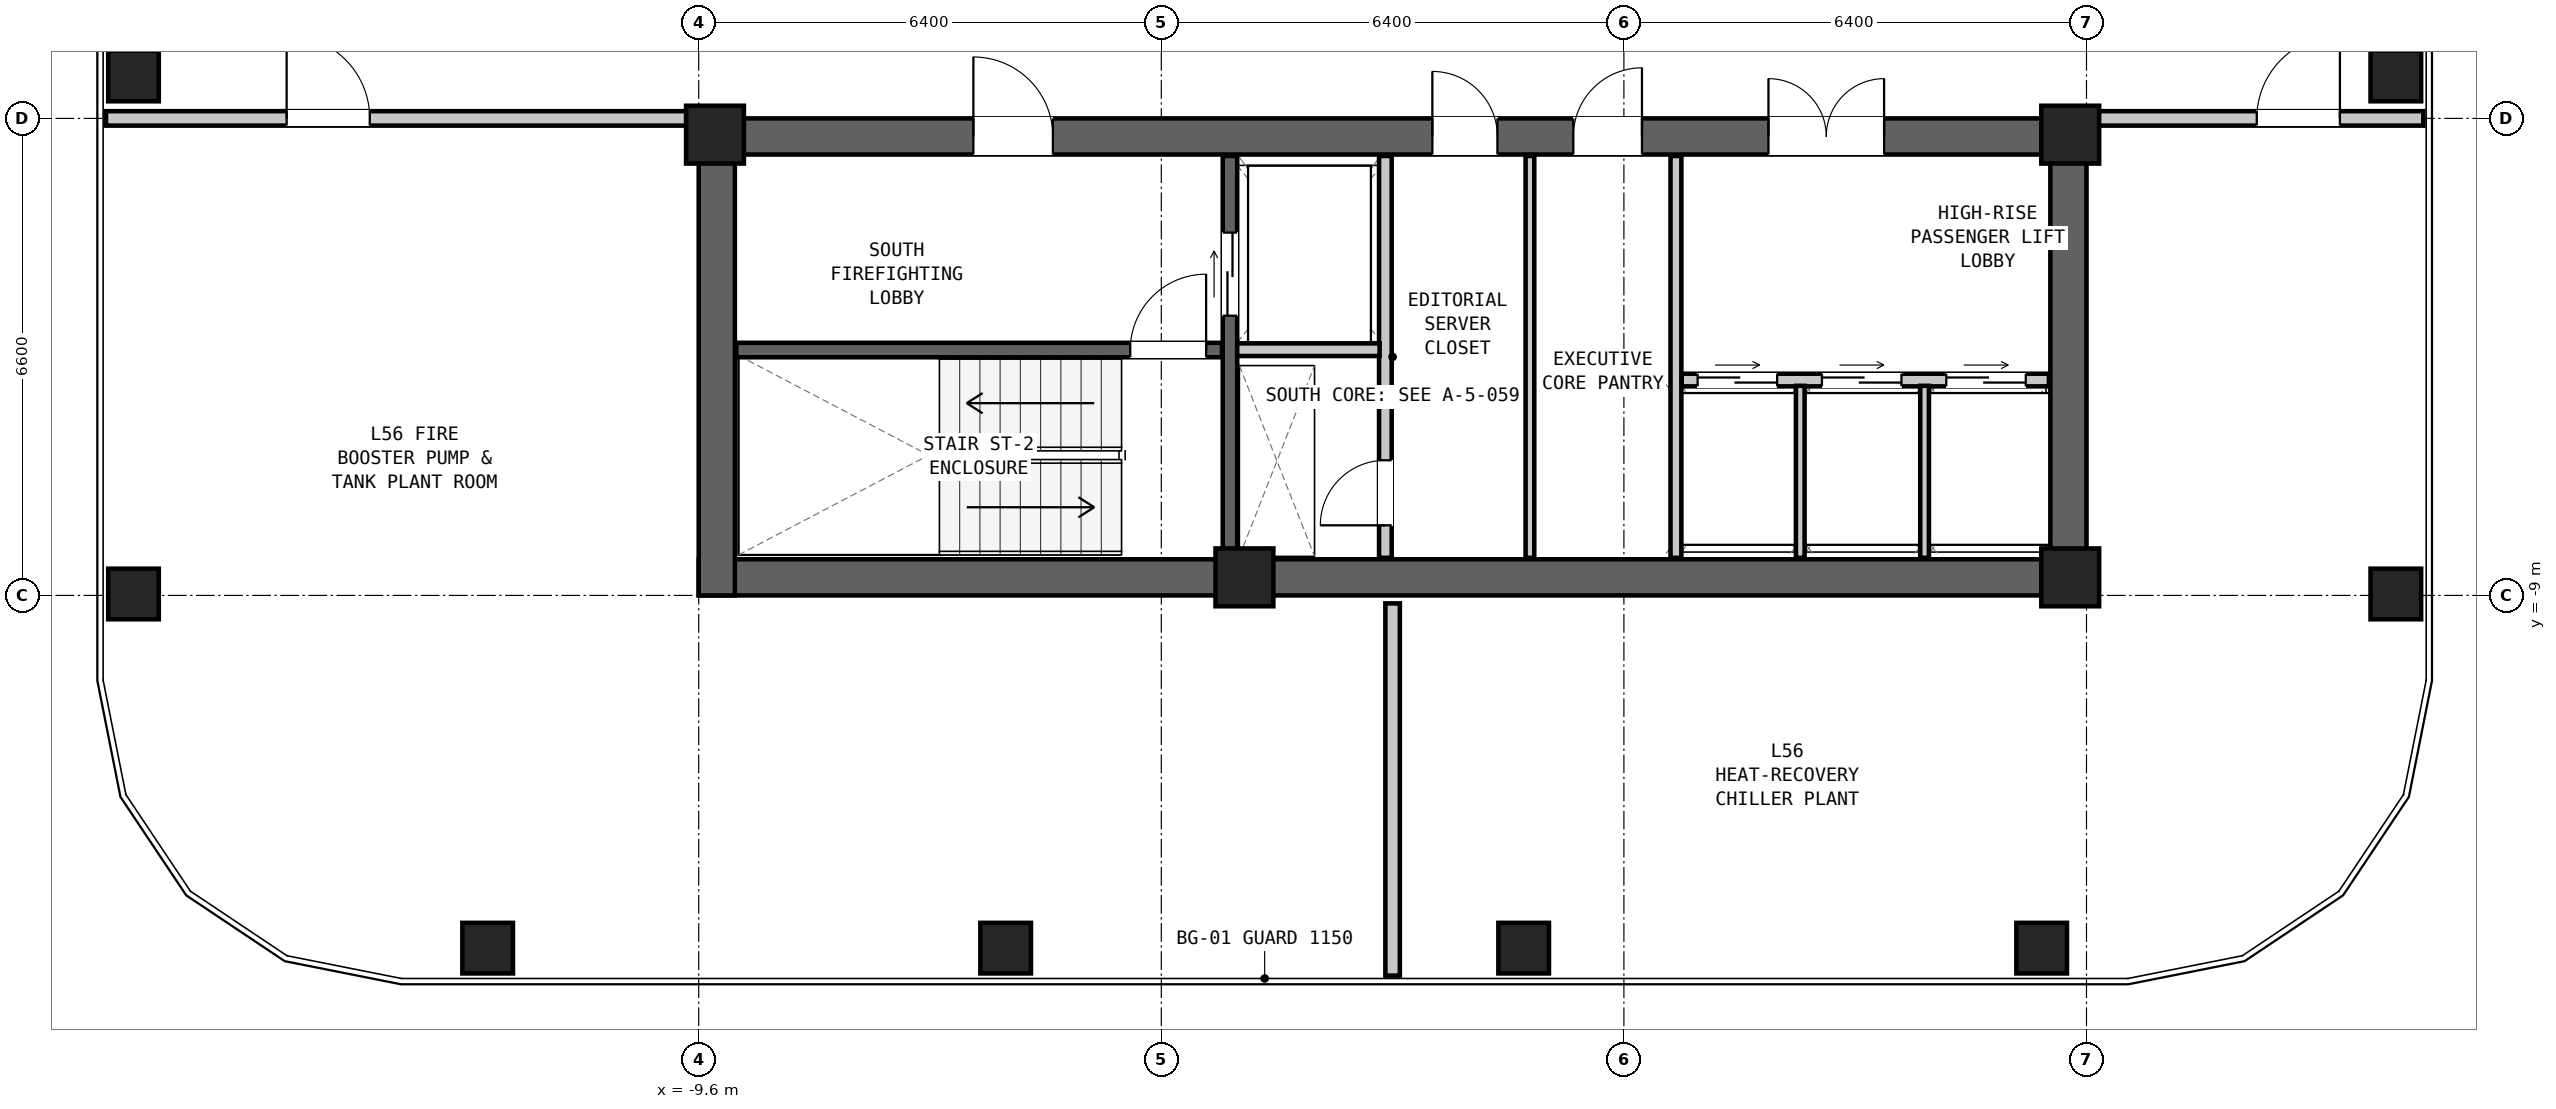
"""IFC4 building model, lengths in metres.
Left out: names, types, materials, properties, quantities, classifications, styles, units other than length and angle.
Written with IfcOpenShell. Run it as: python <this file> out.ifc"""

import sys

from ifc_helpers import new_model, si_unit, direction, frame, frame_2d, origin, origin_2d, place, context, subcontext, project, spatial, rectangle, hollow_rectangle, extrude, element, fill, save


model = new_model("IFC4")
c1 = context("Model", 3, precision=1e-05, world=origin(), true_north=direction((0.0, 1.0)))
c2 = subcontext(c1, "Body", "Model", "MODEL_VIEW")
j1 = project(units=[si_unit("LENGTHUNIT", "METRE"), si_unit("PLANEANGLEUNIT", "RADIAN")], contexts=[c1])
p1 = place(None, origin())
s1 = spatial("IfcSite", under=j1, at=p1, CompositionType="ELEMENT")
p2 = place(p1, origin())
s2 = spatial("IfcBuilding", under=s1, at=p2, CompositionType="ELEMENT")
p3 = place(p2, frame((0.0, 0.0, 191.55)))
s3 = spatial("IfcBuildingStorey", under=s2, at=p3, CompositionType="ELEMENT", Elevation=191.55)
p4 = place(p3, frame((-9.6, -8.75, 0.0), z_axis=(0.0, 0.0, 1.0), x_axis=(1.0, 0.0, 0.0)))
e1 = element("IfcWall", 1, at=p4, inside=s3, PredefinedType="SHEAR", context=c2, shape_type="SweptSolid", body=[
    extrude(rectangle(XDim=19.2, YDim=0.5, at=frame_2d((9.6, 0.0))), origin(), (0.0, 0.0, 1.0), 3.6),
])
p5 = place(p3, frame((-9.6, -2.65, 0.0), z_axis=(0.0, 0.0, 1.0), x_axis=(1.0, 0.0, 0.0)))
e2 = element("IfcWall", 2, at=p5, inside=s3, PredefinedType="SHEAR", context=c2, shape_type="SweptSolid", body=[
    extrude(rectangle(XDim=19.2, YDim=0.5, at=frame_2d((9.6, 0.0))), origin(), (0.0, 0.0, 1.0), 3.6),
])
p6 = place(p5, frame((3.8, 0.0, 0.0)))
e3 = element("IfcOpeningElement", 3, at=p6, cuts=e2, PredefinedType="OPENING", context=c2, shape_type="SweptSolid", body=[
    extrude(rectangle(XDim=1.1, YDim=2.08, at=frame_2d((0.55, 1.04))), frame((0.0, 0.262, 0.0), z_axis=(0.0, -1.0, 0.0), x_axis=(1.0, 0.0, 0.0)), (0.0, 0.0, 1.0), 0.524),
])
p7 = place(p5, frame((10.15, 0.0, 0.0)))
e4 = element("IfcOpeningElement", 4, at=p7, cuts=e2, PredefinedType="OPENING", context=c2, shape_type="SweptSolid", body=[
    extrude(rectangle(XDim=0.9, YDim=2.05, at=frame_2d((0.45, 1.025))), frame((0.0, 0.262, 0.0), z_axis=(0.0, -1.0, 0.0), x_axis=(1.0, 0.0, 0.0)), (0.0, 0.0, 1.0), 0.524),
])
p8 = place(p5, frame((12.1, 0.0, 0.0)))
e5 = element("IfcOpeningElement", 5, at=p8, cuts=e2, PredefinedType="OPENING", context=c2, shape_type="SweptSolid", body=[
    extrude(rectangle(XDim=0.95, YDim=2.1, at=frame_2d((0.475, 1.05))), frame((0.0, 0.262, 0.0), z_axis=(0.0, -1.0, 0.0), x_axis=(1.0, 0.0, 0.0)), (0.0, 0.0, 1.0), 0.524),
])
p9 = place(p5, frame((14.8, 0.0, 0.0)))
e6 = element("IfcOpeningElement", 6, at=p9, cuts=e2, PredefinedType="OPENING", context=c2, shape_type="SweptSolid", body=[
    extrude(rectangle(XDim=1.6, YDim=2.12, at=frame_2d((0.8, 1.06))), frame((0.0, 0.262, 0.0), z_axis=(0.0, -1.0, 0.0), x_axis=(1.0, 0.0, 0.0)), (0.0, 0.0, 1.0), 0.524),
])
for number, where, z_axis, x_axis in (
    (7, (-9.35, -9.0, 0.0), (0.0, 0.0, 1.0), (0.0, 1.0, 0.0)),
    (8, (9.35, -9.0, 0.0), (0.0, 0.0, 1.0), (0.0, 1.0, 0.0)),
):
    element("IfcWall", number, at=place(p3, frame(where, z_axis=z_axis, x_axis=x_axis)), inside=s3, PredefinedType="SHEAR", context=c2, shape_type="SweptSolid", body=[
        extrude(rectangle(XDim=6.6, YDim=0.5, at=frame_2d((3.3, 0.0))), origin(), (0.0, 0.0, 1.0), 3.6),
    ])
for number, where, z_axis, x_axis in (
    (9, (-12.52, -13.88, 0.0), (0.0, 0.0, 1.0), (1.0, 0.0, 0.0)),
    (10, (-5.353, -13.88, 0.0), (0.0, 0.0, 1.0), (1.0, 0.0, 0.0)),
    (11, (1.813, -13.88, 0.0), (0.0, 0.0, 1.0), (1.0, 0.0, 0.0)),
    (12, (8.98, -13.88, 0.0), (0.0, 0.0, 1.0), (1.0, 0.0, 0.0)),
    (13, (13.88, -8.98, 0.0), (0.0, 0.0, 1.0), (0.0, 1.0, 0.0)),
    (14, (13.88, -1.813, 0.0), (0.0, 0.0, 1.0), (0.0, 1.0, 0.0)),
    (15, (-17.42, -1.813, 0.0), (0.0, 0.0, 1.0), (0.0, 1.0, 0.0)),
    (16, (-17.42, -8.98, 0.0), (0.0, 0.0, 1.0), (0.0, 1.0, 0.0)),
):
    element("IfcColumn", number, at=place(p3, frame(where, z_axis=z_axis, x_axis=x_axis)), inside=s3, PredefinedType="COLUMN", context=c2, shape_type="SweptSolid", body=[
        extrude(hollow_rectangle(XDim=0.7, YDim=0.7, WallThickness=0.045, at=origin_2d()), origin(), (0.0, 0.0, 1.0), 3.6),
    ])
for number, where, z_axis, x_axis in (
    (17, (-9.375, -2.625, 0.0), (0.0, 0.0, 1.0), (1.0, 0.0, 0.0)),
    (18, (9.375, -2.625, 0.0), (0.0, 0.0, 1.0), (1.0, 0.0, 0.0)),
    (19, (-2.05, -8.75, 0.0), (0.0, 0.0, 1.0), (1.0, 0.0, 0.0)),
    (20, (9.375, -8.75, 0.0), (0.0, 0.0, 1.0), (1.0, 0.0, 0.0)),
):
    element("IfcColumn", number, at=place(p3, frame(where, z_axis=z_axis, x_axis=x_axis)), inside=s3, PredefinedType="COLUMN", context=c2, shape_type="SweptSolid", body=[
        extrude(rectangle(XDim=0.8, YDim=0.8, at=origin_2d()), origin(), (0.0, 0.0, 1.0), 3.6),
    ])
p10 = place(p3, frame((-9.08, -5.605, 0.0), z_axis=(0.0, 0.0, 1.0), x_axis=(1.0, 0.0, 0.0)))
e21 = element("IfcWall", 21, at=p10, inside=s3, PredefinedType="SHEAR", context=c2, shape_type="SweptSolid", body=[
    extrude(rectangle(XDim=6.72, YDim=0.2, at=frame_2d((3.36, 0.0))), origin(), (0.0, 0.0, 1.0), 3.22),
])
p11 = place(p10, frame((5.45, 0.0, 0.0)))
e22 = element("IfcOpeningElement", 22, at=p11, cuts=e21, PredefinedType="OPENING", context=c2, shape_type="SweptSolid", body=[
    extrude(rectangle(XDim=1.05, YDim=2.08, at=frame_2d((0.525, 1.04))), frame((0.0, 0.112, 0.0), z_axis=(0.0, -1.0, 0.0), x_axis=(1.0, 0.0, 0.0)), (0.0, 0.0, 1.0), 0.224),
])
p12 = place(p3, frame((-2.25, -8.48, 0.0), z_axis=(0.0, 0.0, 1.0), x_axis=(0.0, 1.0, 0.0)))
e23 = element("IfcWall", 23, at=p12, inside=s3, PredefinedType="SHEAR", context=c2, shape_type="SweptSolid", body=[
    extrude(rectangle(XDim=5.56, YDim=0.2, at=frame_2d((2.78, 0.0))), origin(), (0.0, 0.0, 1.0), 3.22),
])
p13 = place(p12, frame((3.35, 0.0, 0.0)))
e24 = element("IfcOpeningElement", 24, at=p13, cuts=e23, PredefinedType="OPENING", context=c2, shape_type="SweptSolid", body=[
    extrude(rectangle(XDim=1.15, YDim=2.08, at=frame_2d((0.575, 1.04))), frame((0.0, 0.112, 0.0), z_axis=(0.0, -1.0, 0.0), x_axis=(1.0, 0.0, 0.0)), (0.0, 0.0, 1.0), 0.224),
])
p14 = place(p3, frame((-0.1, -8.48, 0.0), z_axis=(0.0, 0.0, 1.0), x_axis=(0.0, 1.0, 0.0)))
e25 = element("IfcWall", 25, at=p14, inside=s3, PredefinedType="PARTITIONING", context=c2, shape_type="SweptSolid", body=[
    extrude(rectangle(XDim=5.56, YDim=0.175, at=frame_2d((2.78, 0.0))), origin(), (0.0, 0.0, 1.0), 3.22),
])
p15 = place(p14, frame((0.45, 0.0, 0.0)))
e26 = element("IfcOpeningElement", 26, at=p15, cuts=e25, PredefinedType="OPENING", context=c2, shape_type="SweptSolid", body=[
    extrude(rectangle(XDim=0.9, YDim=2.05, at=frame_2d((0.45, 1.025))), frame((0.0, 0.1, 0.0), z_axis=(0.0, -1.0, 0.0), x_axis=(1.0, 0.0, 0.0)), (0.0, 0.0, 1.0), 0.199),
])
p16 = place(p3, frame((-2.15, -5.6, 0.0), z_axis=(0.0, 0.0, 1.0), x_axis=(1.0, 0.0, 0.0)))
e27 = element("IfcWall", 27, at=p16, inside=s3, PredefinedType="PARTITIONING", context=c2, shape_type="SweptSolid", body=[
    extrude(rectangle(XDim=1.97, YDim=0.175, at=frame_2d((0.985, 0.0))), origin(), (0.0, 0.0, 1.0), 3.22),
])
p17 = place(p3, frame((3.92, -8.48, 0.0), z_axis=(0.0, 0.0, 1.0), x_axis=(0.0, 1.0, 0.0)))
e28 = element("IfcWall", 28, at=p17, inside=s3, PredefinedType="PARTITIONING", context=c2, shape_type="SweptSolid", body=[
    extrude(rectangle(XDim=5.56, YDim=0.15, at=frame_2d((2.78, 0.0))), origin(), (0.0, 0.0, 1.0), 3.22),
])
p18 = place(p3, frame((1.9, -8.48, 0.0), z_axis=(0.0, 0.0, 1.0), x_axis=(0.0, 1.0, 0.0)))
e29 = element("IfcWall", 29, at=p18, inside=s3, PredefinedType="PARTITIONING", context=c2, shape_type="SweptSolid", body=[
    extrude(rectangle(XDim=5.56, YDim=0.12, at=frame_2d((2.78, 0.0))), origin(), (0.0, 0.0, 1.0), 3.22),
])
p19 = place(p3, frame((4.0, -6.02, 0.0), z_axis=(0.0, 0.0, 1.0), x_axis=(1.0, 0.0, 0.0)))
e30 = element("IfcWall", 30, at=p19, inside=s3, PredefinedType="PARTITIONING", context=c2, shape_type="SweptSolid", body=[
    extrude(rectangle(XDim=5.08, YDim=0.175, at=frame_2d((2.54, 0.0))), origin(), (0.0, 0.0, 1.0), 3.22),
])
p20 = place(p19, frame((0.22, 0.0, 0.0)))
e31 = element("IfcOpeningElement", 31, at=p20, cuts=e30, PredefinedType="OPENING", context=c2, shape_type="SweptSolid", body=[
    extrude(rectangle(XDim=1.1, YDim=2.06, at=frame_2d((0.55, 1.03))), frame((0.0, 0.1, 0.0), z_axis=(0.0, -1.0, 0.0), x_axis=(1.0, 0.0, 0.0)), (0.0, 0.0, 1.0), 0.199),
])
p21 = place(p19, frame((1.94, 0.0, 0.0)))
e32 = element("IfcOpeningElement", 32, at=p21, cuts=e30, PredefinedType="OPENING", context=c2, shape_type="SweptSolid", body=[
    extrude(rectangle(XDim=1.1, YDim=2.06, at=frame_2d((0.55, 1.03))), frame((0.0, 0.1, 0.0), z_axis=(0.0, -1.0, 0.0), x_axis=(1.0, 0.0, 0.0)), (0.0, 0.0, 1.0), 0.199),
])
p22 = place(p19, frame((3.66, 0.0, 0.0)))
e33 = element("IfcOpeningElement", 33, at=p22, cuts=e30, PredefinedType="OPENING", context=c2, shape_type="SweptSolid", body=[
    extrude(rectangle(XDim=1.1, YDim=2.06, at=frame_2d((0.55, 1.03))), frame((0.0, 0.1, 0.0), z_axis=(0.0, -1.0, 0.0), x_axis=(1.0, 0.0, 0.0)), (0.0, 0.0, 1.0), 0.199),
])
for number, where, z_axis, x_axis in (
    (34, (5.64, -8.48, 0.0), (0.0, 0.0, 1.0), (0.0, 1.0, 0.0)),
    (35, (7.36, -8.48, 0.0), (0.0, 0.0, 1.0), (0.0, 1.0, 0.0)),
):
    element("IfcWall", number, at=place(p3, frame(where, z_axis=z_axis, x_axis=x_axis)), inside=s3, PredefinedType="PARTITIONING", context=c2, shape_type="SweptSolid", body=[
        extrude(rectangle(XDim=2.38, YDim=0.12, at=frame_2d((1.19, 0.0))), origin(), (0.0, 0.0, 1.0), 3.22),
    ])
p23 = place(p3, frame((-17.8, -2.4, 0.0), z_axis=(0.0, 0.0, 1.0), x_axis=(1.0, 0.0, 0.0)))
e36 = element("IfcWall", 36, at=p23, inside=s3, PredefinedType="PARTITIONING", context=c2, shape_type="SweptSolid", body=[
    extrude(rectangle(XDim=8.09, YDim=0.2, at=frame_2d((4.045, 0.0))), origin(), (0.0, 0.0, 1.0), 2.42),
])
p24 = place(p23, frame((2.499, 0.0, 0.0)))
e37 = element("IfcOpeningElement", 37, at=p24, cuts=e36, PredefinedType="OPENING", context=c2, shape_type="SweptSolid", body=[
    extrude(rectangle(XDim=1.15, YDim=2.1, at=frame_2d((0.575, 1.05))), frame((0.0, 0.112, 0.0), z_axis=(0.0, -1.0, 0.0), x_axis=(1.0, 0.0, 0.0)), (0.0, 0.0, 1.0), 0.224),
])
p25 = place(p3, frame((9.71, -2.4, 0.0), z_axis=(0.0, 0.0, 1.0), x_axis=(1.0, 0.0, 0.0)))
e38 = element("IfcWall", 38, at=p25, inside=s3, PredefinedType="PARTITIONING", context=c2, shape_type="SweptSolid", body=[
    extrude(rectangle(XDim=4.55, YDim=0.2, at=frame_2d((2.275, 0.0))), origin(), (0.0, 0.0, 1.0), 2.42),
])
p26 = place(p25, frame((2.246, 0.0, 0.0)))
e39 = element("IfcOpeningElement", 39, at=p26, cuts=e38, PredefinedType="OPENING", context=c2, shape_type="SweptSolid", body=[
    extrude(rectangle(XDim=1.15, YDim=2.1, at=frame_2d((0.575, 1.05))), frame((0.0, 0.112, 0.0), z_axis=(0.0, -1.0, 0.0), x_axis=(1.0, 0.0, 0.0)), (0.0, 0.0, 1.0), 0.224),
])
p27 = place(p3, frame((0.0, -14.26, 0.0), z_axis=(0.0, 0.0, 1.0), x_axis=(0.0, 1.0, 0.0)))
e40 = element("IfcWall", 40, at=p27, inside=s3, PredefinedType="PARTITIONING", context=c2, shape_type="SweptSolid", body=[
    extrude(rectangle(XDim=5.15, YDim=0.2, at=frame_2d((2.575, 0.0))), origin(), (0.0, 0.0, 1.0), 2.438),
])
p28 = place(p11, origin())
e41 = element("IfcDoor", 41, at=p28, inside=s3, OperationType="SINGLE_SWING_RIGHT", PredefinedType="DOOR", context=c2, shape_type="SweptSolid", body=[
    extrude(rectangle(XDim=1.05, YDim=2.08, at=frame_2d((0.525, 1.04))), frame((0.0, 0.025, 0.0), z_axis=(0.0, -1.0, 0.0), x_axis=(1.0, 0.0, 0.0)), (0.0, 0.0, 1.0), 0.05),
])
fill(e22, e41)
p29 = place(p6, origin())
e42 = element("IfcDoor", 42, at=p29, inside=s3, OperationType="SINGLE_SWING_LEFT", PredefinedType="DOOR", context=c2, shape_type="SweptSolid", body=[
    extrude(rectangle(XDim=1.1, YDim=2.08, at=frame_2d((0.55, 1.04))), frame((0.0, 0.025, 0.0), z_axis=(0.0, -1.0, 0.0), x_axis=(1.0, 0.0, 0.0)), (0.0, 0.0, 1.0), 0.05),
])
fill(e3, e42)
p30 = place(p13, origin())
e43 = element("IfcDoor", 43, at=p30, inside=s3, OperationType="DOUBLE_DOOR_SLIDING", PredefinedType="DOOR", context=c2, shape_type="SweptSolid", body=[
    extrude(rectangle(XDim=1.15, YDim=2.08, at=frame_2d((0.575, 1.04))), frame((0.0, 0.025, 0.0), z_axis=(0.0, -1.0, 0.0), x_axis=(1.0, 0.0, 0.0)), (0.0, 0.0, 1.0), 0.05),
])
fill(e24, e43)
p31 = place(p15, origin())
e44 = element("IfcDoor", 44, at=p31, inside=s3, OperationType="SINGLE_SWING_LEFT", PredefinedType="DOOR", context=c2, shape_type="SweptSolid", body=[
    extrude(rectangle(XDim=0.9, YDim=2.05, at=frame_2d((0.45, 1.025))), frame((0.0, 0.025, 0.0), z_axis=(0.0, -1.0, 0.0), x_axis=(1.0, 0.0, 0.0)), (0.0, 0.0, 1.0), 0.05),
])
fill(e26, e44)
p32 = place(p7, origin())
e45 = element("IfcDoor", 45, at=p32, inside=s3, OperationType="SINGLE_SWING_LEFT", PredefinedType="DOOR", context=c2, shape_type="SweptSolid", body=[
    extrude(rectangle(XDim=0.9, YDim=2.05, at=frame_2d((0.45, 1.025))), frame((0.0, 0.025, 0.0), z_axis=(0.0, -1.0, 0.0), x_axis=(1.0, 0.0, 0.0)), (0.0, 0.0, 1.0), 0.05),
])
fill(e4, e45)
p33 = place(p8, origin())
e46 = element("IfcDoor", 46, at=p33, inside=s3, OperationType="SINGLE_SWING_RIGHT", PredefinedType="DOOR", context=c2, shape_type="SweptSolid", body=[
    extrude(rectangle(XDim=0.95, YDim=2.1, at=frame_2d((0.475, 1.05))), frame((0.0, 0.025, 0.0), z_axis=(0.0, -1.0, 0.0), x_axis=(1.0, 0.0, 0.0)), (0.0, 0.0, 1.0), 0.05),
])
fill(e5, e46)
p34 = place(p20, origin())
e47 = element("IfcDoor", 47, at=p34, inside=s3, OperationType="DOUBLE_DOOR_SLIDING", PredefinedType="DOOR", context=c2, shape_type="SweptSolid", body=[
    extrude(rectangle(XDim=1.1, YDim=2.06, at=frame_2d((0.55, 1.03))), frame((0.0, 0.025, 0.0), z_axis=(0.0, -1.0, 0.0), x_axis=(1.0, 0.0, 0.0)), (0.0, 0.0, 1.0), 0.05),
])
fill(e31, e47)
p35 = place(p21, origin())
e48 = element("IfcDoor", 48, at=p35, inside=s3, OperationType="DOUBLE_DOOR_SLIDING", PredefinedType="DOOR", context=c2, shape_type="SweptSolid", body=[
    extrude(rectangle(XDim=1.1, YDim=2.06, at=frame_2d((0.55, 1.03))), frame((0.0, 0.025, 0.0), z_axis=(0.0, -1.0, 0.0), x_axis=(1.0, 0.0, 0.0)), (0.0, 0.0, 1.0), 0.05),
])
fill(e32, e48)
p36 = place(p22, origin())
e49 = element("IfcDoor", 49, at=p36, inside=s3, OperationType="DOUBLE_DOOR_SLIDING", PredefinedType="DOOR", context=c2, shape_type="SweptSolid", body=[
    extrude(rectangle(XDim=1.1, YDim=2.06, at=frame_2d((0.55, 1.03))), frame((0.0, 0.025, 0.0), z_axis=(0.0, -1.0, 0.0), x_axis=(1.0, 0.0, 0.0)), (0.0, 0.0, 1.0), 0.05),
])
fill(e33, e49)
p37 = place(p9, origin())
e50 = element("IfcDoor", 50, at=p37, inside=s3, OperationType="DOUBLE_DOOR_SINGLE_SWING", PredefinedType="DOOR", context=c2, shape_type="SweptSolid", body=[
    extrude(rectangle(XDim=1.6, YDim=2.12, at=frame_2d((0.8, 1.06))), frame((0.0, 0.025, 0.0), z_axis=(0.0, -1.0, 0.0), x_axis=(1.0, 0.0, 0.0)), (0.0, 0.0, 1.0), 0.05),
])
fill(e6, e50)
p38 = place(p24, origin())
e51 = element("IfcDoor", 51, at=p38, inside=s3, OperationType="SINGLE_SWING_LEFT", PredefinedType="DOOR", context=c2, shape_type="SweptSolid", body=[
    extrude(rectangle(XDim=1.15, YDim=2.1, at=frame_2d((0.575, 1.05))), frame((0.0, 0.025, 0.0), z_axis=(0.0, -1.0, 0.0), x_axis=(1.0, 0.0, 0.0)), (0.0, 0.0, 1.0), 0.05),
])
fill(e37, e51)
p39 = place(p26, origin())
e52 = element("IfcDoor", 52, at=p39, inside=s3, OperationType="SINGLE_SWING_RIGHT", PredefinedType="DOOR", context=c2, shape_type="SweptSolid", body=[
    extrude(rectangle(XDim=1.15, YDim=2.1, at=frame_2d((0.575, 1.05))), frame((0.0, 0.025, 0.0), z_axis=(0.0, -1.0, 0.0), x_axis=(1.0, 0.0, 0.0)), (0.0, 0.0, 1.0), 0.05),
])
fill(e39, e52)
save(model, sys.argv[1])
